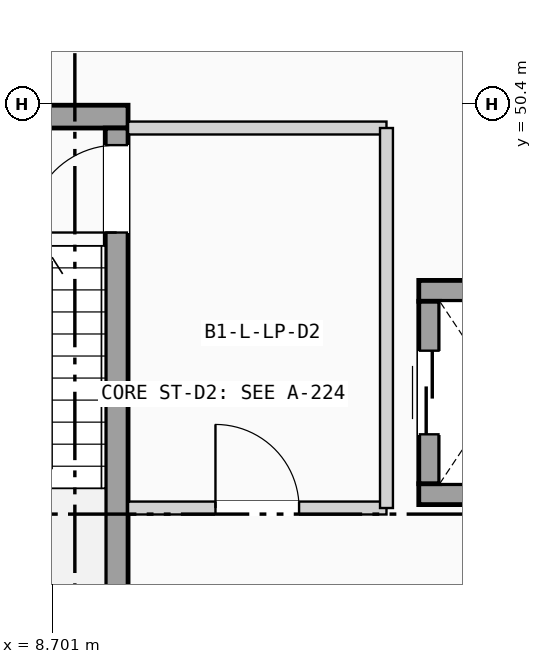
"""IFC4 building model, lengths in metres.
Left out: names, types, materials, properties, quantities, classifications, styles, units other than length and angle.
Written with IfcOpenShell. Run it as: python <this file> out.ifc"""

import sys

from ifc_helpers import new_model, si_unit, direction, frame, frame_2d, origin, place, context, subcontext, project, spatial, rectangle, extrude, element, fill, save


model = new_model("IFC4")
c1 = context("Model", 3, precision=1e-05, world=origin(), true_north=direction((0.0, 1.0)))
c2 = subcontext(c1, "Body", "Model", "MODEL_VIEW")
j1 = project(units=[si_unit("LENGTHUNIT", "METRE"), si_unit("PLANEANGLEUNIT", "RADIAN")], contexts=[c1])
p1 = place(None, origin())
s1 = spatial("IfcSite", under=j1, at=p1, CompositionType="ELEMENT")
p2 = place(p1, origin())
s2 = spatial("IfcBuilding", under=s1, at=p2, CompositionType="ELEMENT")
p3 = place(p2, frame((0.0, 0.0, -4.2)))
s3 = spatial("IfcBuildingStorey", under=s2, at=p3, CompositionType="ELEMENT", Elevation=-4.2)
p4 = place(p3, frame((5.775, 50.23, 0.0), z_axis=(0.0, 0.0, 1.0), x_axis=(1.0, 0.0, 0.0)))
e1 = element("IfcWall", 1, at=p4, inside=s3, PredefinedType="SHEAR", context=c2, shape_type="SweptSolid", body=[
    extrude(rectangle(XDim=3.925, YDim=0.3, at=frame_2d((1.962, 0.0))), origin(), (0.0, 0.0, 1.0), 3.92),
])
p5 = place(p3, frame((9.55, 43.08, 0.0), z_axis=(0.0, 0.0, 1.0), x_axis=(0.0, 1.0, 0.0)))
e2 = element("IfcWall", 2, at=p5, inside=s3, PredefinedType="SHEAR", context=c2, shape_type="SweptSolid", body=[
    extrude(rectangle(XDim=7.0, YDim=0.3, at=frame_2d((3.5, 0.0))), origin(), (0.0, 0.0, 1.0), 3.92),
])
p6 = place(p5, frame((5.625, 0.0, 0.0)))
e3 = element("IfcOpeningElement", 3, at=p6, cuts=e2, PredefinedType="OPENING", context=c2, shape_type="SweptSolid", body=[
    extrude(rectangle(XDim=1.15, YDim=2.12, at=frame_2d((0.575, 1.06))), frame((0.0, 0.16, 0.0), z_axis=(0.0, -1.0, 0.0), x_axis=(1.0, 0.0, 0.0)), (0.0, 0.0, 1.0), 0.32),
])
for number, where, z_axis, x_axis in (
    (4, (13.525, 45.262, 0.0), (0.0, 0.0, 1.0), (1.0, 0.0, 0.0)),
    (5, (13.525, 47.938, 0.0), (0.0, 0.0, 1.0), (1.0, 0.0, 0.0)),
):
    element("IfcWall", number, at=place(p3, frame(where, z_axis=z_axis, x_axis=x_axis)), inside=s3, PredefinedType="SHEAR", context=c2, shape_type="SweptSolid", body=[
        extrude(rectangle(XDim=2.15, YDim=0.275, at=frame_2d((1.075, 0.0))), origin(), (0.0, 0.0, 1.0), 3.92),
    ])
p7 = place(p3, frame((13.663, 45.4, 0.0), z_axis=(0.0, 0.0, 1.0), x_axis=(0.0, 1.0, 0.0)))
e6 = element("IfcWall", 6, at=p7, inside=s3, PredefinedType="SHEAR", context=c2, shape_type="SweptSolid", body=[
    extrude(rectangle(XDim=2.4, YDim=0.275, at=frame_2d((1.2, 0.0))), origin(), (0.0, 0.0, 1.0), 3.92),
])
p8 = place(p7, frame((0.65, 0.0, 0.0)))
e7 = element("IfcOpeningElement", 7, at=p8, cuts=e6, PredefinedType="OPENING", context=c2, shape_type="SweptSolid", body=[
    extrude(rectangle(XDim=1.1, YDim=2.15, at=frame_2d((0.55, 1.075))), frame((0.0, 0.147, 0.0), z_axis=(0.0, -1.0, 0.0), x_axis=(1.0, 0.0, 0.0)), (0.0, 0.0, 1.0), 0.295),
])
p9 = place(p3, frame((9.7, 45.08, 0.0), z_axis=(0.0, 0.0, 1.0), x_axis=(1.0, 0.0, 0.0)))
e8 = element("IfcWall", 8, at=p9, inside=s3, PredefinedType="PARTITIONING", context=c2, shape_type="SweptSolid", body=[
    extrude(rectangle(XDim=3.4, YDim=0.17, at=frame_2d((1.7, 0.0))), origin(), (0.0, 0.0, 1.0), 3.84),
])
p10 = place(p9, frame((1.15, 0.0, 0.0)))
e9 = element("IfcOpeningElement", 9, at=p10, cuts=e8, PredefinedType="OPENING", context=c2, shape_type="SweptSolid", body=[
    extrude(rectangle(XDim=1.1, YDim=2.12, at=frame_2d((0.55, 1.06))), frame((0.0, 0.095, 0.0), z_axis=(0.0, -1.0, 0.0), x_axis=(1.0, 0.0, 0.0)), (0.0, 0.0, 1.0), 0.19),
])
p11 = place(p3, frame((9.7, 50.08, 0.0), z_axis=(0.0, 0.0, 1.0), x_axis=(1.0, 0.0, 0.0)))
e10 = element("IfcWall", 10, at=p11, inside=s3, PredefinedType="PARTITIONING", context=c2, shape_type="SweptSolid", body=[
    extrude(rectangle(XDim=3.4, YDim=0.17, at=frame_2d((1.7, 0.0))), origin(), (0.0, 0.0, 1.0), 3.19),
])
p12 = place(p3, frame((13.1, 45.08, 0.0), z_axis=(0.0, 0.0, 1.0), x_axis=(0.0, 1.0, 0.0)))
e11 = element("IfcWall", 11, at=p12, inside=s3, PredefinedType="PARTITIONING", context=c2, shape_type="SweptSolid", body=[
    extrude(rectangle(XDim=5.0, YDim=0.17, at=frame_2d((2.5, 0.0))), origin(), (0.0, 0.0, 1.0), 3.84),
])
p13 = place(p6, origin())
e12 = element("IfcDoor", 12, at=p13, inside=s3, OperationType="SINGLE_SWING_LEFT", PredefinedType="DOOR", context=c2, shape_type="SweptSolid", body=[
    extrude(rectangle(XDim=1.15, YDim=2.12, at=frame_2d((0.575, 1.06))), frame((0.0, 0.025, 0.0), z_axis=(0.0, -1.0, 0.0), x_axis=(1.0, 0.0, 0.0)), (0.0, 0.0, 1.0), 0.05),
])
fill(e3, e12)
p14 = place(p8, origin())
e13 = element("IfcDoor", 13, at=p14, inside=s3, OperationType="SLIDING_TO_LEFT", PredefinedType="DOOR", context=c2, shape_type="SweptSolid", body=[
    extrude(rectangle(XDim=1.1, YDim=2.15, at=frame_2d((0.55, 1.075))), frame((0.0, 0.025, 0.0), z_axis=(0.0, -1.0, 0.0), x_axis=(1.0, 0.0, 0.0)), (0.0, 0.0, 1.0), 0.05),
])
fill(e7, e13)
p15 = place(p10, origin())
e14 = element("IfcDoor", 14, at=p15, inside=s3, OperationType="SINGLE_SWING_LEFT", PredefinedType="DOOR", context=c2, shape_type="SweptSolid", body=[
    extrude(rectangle(XDim=1.1, YDim=2.12, at=frame_2d((0.55, 1.06))), frame((0.0, 0.025, 0.0), z_axis=(0.0, -1.0, 0.0), x_axis=(1.0, 0.0, 0.0)), (0.0, 0.0, 1.0), 0.05),
])
fill(e9, e14)
save(model, sys.argv[1])
